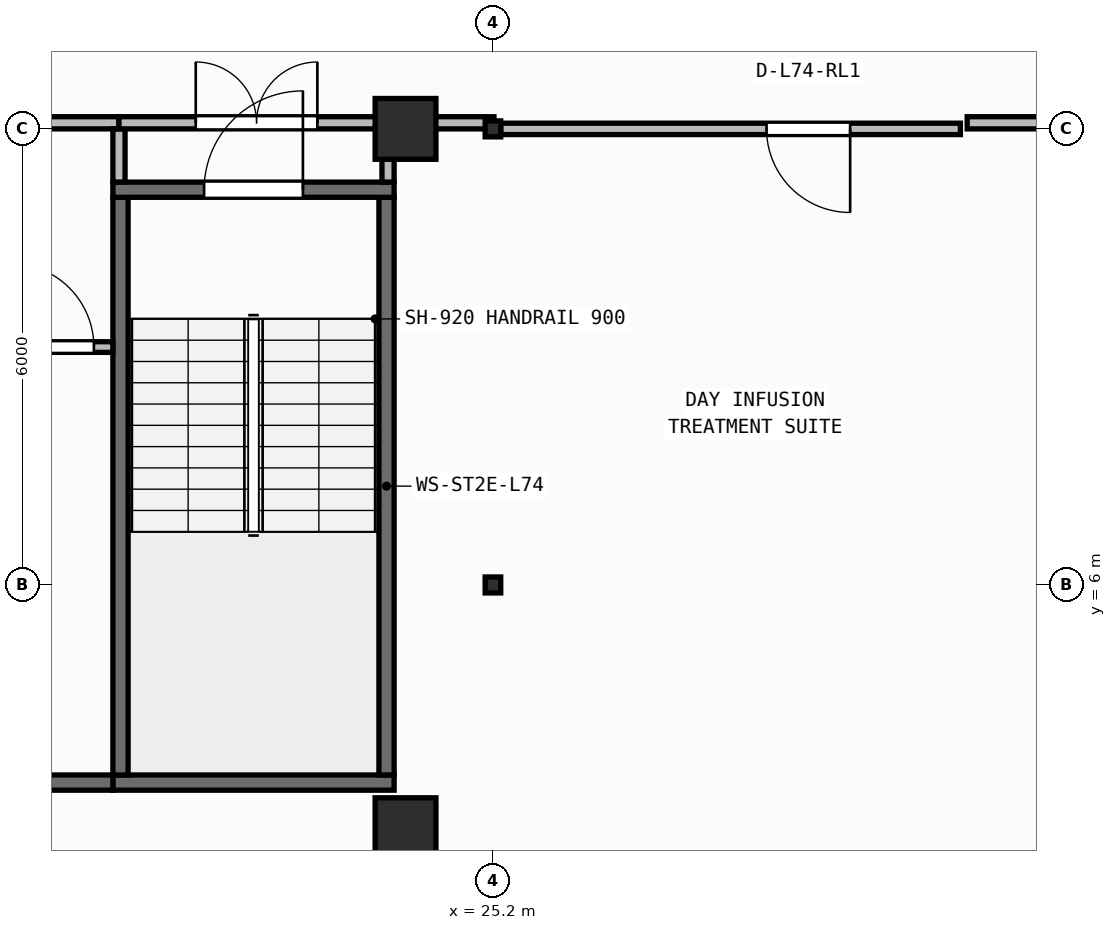
"""IFC4 building model, lengths in metres.
Left out: names, types, materials, properties, quantities, classifications, styles, units other than length and angle.
Written with IfcOpenShell. Run it as: python <this file> out.ifc"""

import sys

from ifc_helpers import new_model, si_unit, direction, frame, frame_2d, origin, origin_2d, place, context, subcontext, project, spatial, rectangle, i_section, extrude, element, fill, save


model = new_model("IFC4")
c1 = context("Model", 3, precision=1e-05, world=origin(), true_north=direction((0.0, 1.0)))
c2 = subcontext(c1, "Body", "Model", "MODEL_VIEW")
j1 = project(units=[si_unit("LENGTHUNIT", "METRE"), si_unit("PLANEANGLEUNIT", "RADIAN")], contexts=[c1])
p1 = place(None, origin())
s1 = spatial("IfcSite", under=j1, at=p1, CompositionType="ELEMENT")
p2 = place(p1, origin())
s2 = spatial("IfcBuilding", under=s1, at=p2, CompositionType="ELEMENT")
p3 = place(p2, frame((0.0, 0.0, 300.0)))
s3 = spatial("IfcBuildingStorey", under=s2, at=p3, CompositionType="ELEMENT", Elevation=300.0)
p4 = place(p3, frame((24.05, 2.8, 0.0), z_axis=(0.0, 0.0, 1.0), x_axis=(1.0, 0.0, 0.0)))
e1 = element("IfcColumn", 1, at=p4, inside=s3, PredefinedType="COLUMN", context=c2, shape_type="SweptSolid", body=[
    extrude(rectangle(XDim=0.8, YDim=0.8, at=origin_2d()), origin(), (0.0, 0.0, 1.0), 3.95),
])
p5 = place(p3, frame((25.2, 6.0, 0.0), z_axis=(0.0, 0.0, 1.0), x_axis=(1.0, 0.0, 0.0)))
e2 = element("IfcColumn", 2, at=p5, inside=s3, PredefinedType="COLUMN", context=c2, shape_type="SweptSolid", body=[
    extrude(i_section(OverallWidth=0.205, OverallDepth=0.21, WebThickness=0.009, FlangeThickness=0.014, FilletRadius=0.011, at=origin_2d()), origin(), (0.0, 0.0, 1.0), 3.95),
])
p6 = place(p3, frame((24.05, 12.0, 0.0), z_axis=(0.0, 0.0, 1.0), x_axis=(1.0, 0.0, 0.0)))
e3 = element("IfcColumn", 3, at=p6, inside=s3, PredefinedType="COLUMN", context=c2, shape_type="SweptSolid", body=[
    extrude(rectangle(XDim=0.8, YDim=0.8, at=origin_2d()), origin(), (0.0, 0.0, 1.0), 3.95),
])
p7 = place(p3, frame((25.2, 12.0, 0.0), z_axis=(0.0, 0.0, 1.0), x_axis=(1.0, 0.0, 0.0)))
e4 = element("IfcColumn", 4, at=p7, inside=s3, PredefinedType="COLUMN", context=c2, shape_type="SweptSolid", body=[
    extrude(i_section(OverallWidth=0.205, OverallDepth=0.21, WebThickness=0.009, FlangeThickness=0.014, FilletRadius=0.011, at=origin_2d()), origin(), (0.0, 0.0, 1.0), 3.95),
])
p8 = place(p3, frame((2.46, 0.171, 0.0), z_axis=(0.0, 0.0, 1.0), x_axis=(0.997760665813, 0.066885377746, 0.0)))
e5 = element("IfcWall", 5, at=p8, inside=s3, PredefinedType="STANDARD", context=c2, shape_type="SweptSolid", body=[
    extrude(rectangle(XDim=35.56, YDim=0.26, at=frame_2d((17.78, 0.0))), origin(), (0.0, 0.0, 1.0), 3.67),
])
p9 = place(p8, frame((16.58, 0.0, 0.9)))
e6 = element("IfcOpeningElement", 6, at=p9, cuts=e5, PredefinedType="OPENING", context=c2, shape_type="SweptSolid", body=[
    extrude(rectangle(XDim=2.4, YDim=1.65, at=frame_2d((1.2, 0.825))), frame((0.0, 0.14, 0.0), z_axis=(0.0, -1.0, 0.0), x_axis=(1.0, 0.0, 0.0)), (0.0, 0.0, 1.0), 0.28),
])
p10 = place(p3, frame((20.2, 3.4, 0.0), z_axis=(0.0, 0.0, 1.0), x_axis=(1.0, 0.0, 0.0)))
e7 = element("IfcWall", 7, at=p10, inside=s3, PredefinedType="SHEAR", context=c2, shape_type="SweptSolid", body=[
    extrude(rectangle(XDim=3.7, YDim=0.2, at=frame_2d((1.85, 0.0))), origin(), (0.0, 0.0, 1.0), 3.67),
])
for number, where, z_axis, x_axis in (
    (8, (20.3, 3.5, 0.0), (0.0, 0.0, 1.0), (0.0, 1.0, 0.0)),
    (9, (23.8, 3.5, 0.0), (0.0, 0.0, 1.0), (0.0, 1.0, 0.0)),
):
    element("IfcWall", number, at=place(p3, frame(where, z_axis=z_axis, x_axis=x_axis)), inside=s3, PredefinedType="SHEAR", context=c2, shape_type="SweptSolid", body=[
        extrude(rectangle(XDim=7.6, YDim=0.2, at=frame_2d((3.8, 0.0))), origin(), (0.0, 0.0, 1.0), 3.67),
    ])
p11 = place(p3, frame((20.2, 11.2, 0.0), z_axis=(0.0, 0.0, 1.0), x_axis=(1.0, 0.0, 0.0)))
e10 = element("IfcWall", 10, at=p11, inside=s3, PredefinedType="SHEAR", context=c2, shape_type="SweptSolid", body=[
    extrude(rectangle(XDim=3.7, YDim=0.2, at=frame_2d((1.85, 0.0))), origin(), (0.0, 0.0, 1.0), 3.67),
])
p12 = place(p11, frame((1.2, 0.0, 0.0)))
e11 = element("IfcOpeningElement", 11, at=p12, cuts=e10, PredefinedType="OPENING", context=c2, shape_type="SweptSolid", body=[
    extrude(rectangle(XDim=1.3, YDim=2.15, at=frame_2d((0.65, 1.075))), frame((0.0, 0.11, 0.0), z_axis=(0.0, -1.0, 0.0), x_axis=(1.0, 0.0, 0.0)), (0.0, 0.0, 1.0), 0.22),
])
p13 = place(p3, frame((6.5, 3.4, 0.0), z_axis=(0.0, 0.0, 1.0), x_axis=(1.0, 0.0, 0.0)))
e12 = element("IfcWall", 12, at=p13, inside=s3, PredefinedType="SHEAR", context=c2, shape_type="SweptSolid", body=[
    extrude(rectangle(XDim=13.7, YDim=0.2, at=frame_2d((6.85, 0.0))), origin(), (0.0, 0.0, 1.0), 3.67),
])
p14 = place(p3, frame((18.61, 9.13, 0.0), z_axis=(0.0, 0.0, 1.0), x_axis=(1.0, 0.0, 0.0)))
e13 = element("IfcWall", 13, at=p14, inside=s3, PredefinedType="PARTITIONING", context=c2, shape_type="SweptSolid", body=[
    extrude(rectangle(XDim=1.59, YDim=0.14, at=frame_2d((0.795, 0.0))), origin(), (0.0, 0.0, 1.0), 3.67),
])
p15 = place(p14, frame((0.24, 0.0, 0.0)))
e14 = element("IfcOpeningElement", 14, at=p15, cuts=e13, PredefinedType="OPENING", context=c2, shape_type="SweptSolid", body=[
    extrude(rectangle(XDim=1.1, YDim=2.1, at=frame_2d((0.55, 1.05))), frame((0.0, 0.08, 0.0), z_axis=(0.0, -1.0, 0.0), x_axis=(1.0, 0.0, 0.0)), (0.0, 0.0, 1.0), 0.16),
])
p16 = place(p3, frame((12.58, 12.08, 0.0), z_axis=(0.0, 0.0, 1.0), x_axis=(1.0, 0.0, 0.0)))
e15 = element("IfcWall", 15, at=p16, inside=s3, PredefinedType="PARTITIONING", context=c2, shape_type="SweptSolid", body=[
    extrude(rectangle(XDim=7.7, YDim=0.16, at=frame_2d((3.85, 0.0))), origin(), (0.0, 0.0, 1.0), 3.117),
])
p17 = place(p16, frame((3.05, 0.0, 0.0)))
e16 = element("IfcOpeningElement", 16, at=p17, cuts=e15, PredefinedType="OPENING", context=c2, shape_type="SweptSolid", body=[
    extrude(rectangle(XDim=1.6, YDim=2.05, at=frame_2d((0.8, 1.025))), frame((0.0, 0.09, 0.0), z_axis=(0.0, -1.0, 0.0), x_axis=(1.0, 0.0, 0.0)), (0.0, 0.0, 1.0), 0.18),
])
p18 = place(p3, frame((20.28, 11.3, 0.0), z_axis=(0.0, 0.0, 1.0), x_axis=(0.0, 1.0, 0.0)))
e17 = element("IfcWall", 17, at=p18, inside=s3, PredefinedType="PARTITIONING", context=c2, shape_type="SweptSolid", body=[
    extrude(rectangle(XDim=0.7, YDim=0.16, at=frame_2d((0.35, 0.0))), origin(), (0.0, 0.0, 1.0), 3.67),
])
p19 = place(p3, frame((20.28, 12.08, 0.0), z_axis=(0.0, 0.0, 1.0), x_axis=(1.0, 0.0, 0.0)))
e18 = element("IfcWall", 18, at=p19, inside=s3, PredefinedType="PARTITIONING", context=c2, shape_type="SweptSolid", body=[
    extrude(rectangle(XDim=3.62, YDim=0.16, at=frame_2d((1.81, 0.0))), origin(), (0.0, 0.0, 1.0), 3.117),
])
p20 = place(p19, frame((1.01, 0.0, 0.0)))
e19 = element("IfcOpeningElement", 19, at=p20, cuts=e18, PredefinedType="OPENING", context=c2, shape_type="SweptSolid", body=[
    extrude(rectangle(XDim=1.6, YDim=2.05, at=frame_2d((0.8, 1.025))), frame((0.0, 0.09, 0.0), z_axis=(0.0, -1.0, 0.0), x_axis=(1.0, 0.0, 0.0)), (0.0, 0.0, 1.0), 0.18),
])
p21 = place(p3, frame((23.82, 11.3, 0.0), z_axis=(0.0, 0.0, 1.0), x_axis=(0.0, 1.0, 0.0)))
e20 = element("IfcWall", 20, at=p21, inside=s3, PredefinedType="PARTITIONING", context=c2, shape_type="SweptSolid", body=[
    extrude(rectangle(XDim=0.7, YDim=0.16, at=frame_2d((0.35, 0.0))), origin(), (0.0, 0.0, 1.0), 3.67),
])
p22 = place(p3, frame((31.35, 12.0, 0.0), z_axis=(0.0, 0.0, 1.0), x_axis=(-1.0, 0.0, 0.0)))
e21 = element("IfcWall", 21, at=p22, inside=s3, PredefinedType="PARTITIONING", context=c2, shape_type="SweptSolid", body=[
    extrude(rectangle(XDim=6.048, YDim=0.15, at=frame_2d((3.024, 0.0))), origin(), (0.0, 0.0, 1.0), 3.117),
])
p23 = place(p22, frame((1.451, 0.0, 0.0)))
e22 = element("IfcOpeningElement", 22, at=p23, cuts=e21, PredefinedType="OPENING", context=c2, shape_type="SweptSolid", body=[
    extrude(rectangle(XDim=1.1, YDim=2.1, at=frame_2d((0.55, 1.05))), frame((0.0, 0.085, 0.0), z_axis=(0.0, -1.0, 0.0), x_axis=(1.0, 0.0, 0.0)), (0.0, 0.0, 1.0), 0.17),
])
p24 = place(p3, frame((24.02, 12.08, 0.0), z_axis=(0.0, 0.0, 1.0), x_axis=(1.0, 0.0, 0.0)))
e23 = element("IfcWall", 23, at=p24, inside=s3, PredefinedType="PARTITIONING", context=c2, shape_type="SweptSolid", body=[
    extrude(rectangle(XDim=1.193, YDim=0.16, at=frame_2d((0.597, 0.0))), origin(), (0.0, 0.0, 1.0), 3.117),
])
p25 = place(p3, frame((31.439, 12.08, 0.0), z_axis=(0.0, 0.0, 1.0), x_axis=(1.0, 0.0, 0.0)))
e24 = element("IfcWall", 24, at=p25, inside=s3, PredefinedType="PARTITIONING", context=c2, shape_type="SweptSolid", body=[
    extrude(rectangle(XDim=2.174, YDim=0.16, at=frame_2d((1.087, 0.0))), origin(), (0.0, 0.0, 1.0), 3.117),
])
p26 = place(p12, origin())
e25 = element("IfcDoor", 25, at=p26, inside=s3, OperationType="SINGLE_SWING_RIGHT", PredefinedType="DOOR", context=c2, shape_type="SweptSolid", body=[
    extrude(rectangle(XDim=1.3, YDim=2.15, at=frame_2d((0.65, 1.075))), frame((0.0, 0.025, 0.0), z_axis=(0.0, -1.0, 0.0), x_axis=(1.0, 0.0, 0.0)), (0.0, 0.0, 1.0), 0.05),
])
fill(e11, e25)
p27 = place(p15, origin())
e26 = element("IfcDoor", 26, at=p27, inside=s3, OperationType="SINGLE_SWING_LEFT", PredefinedType="DOOR", context=c2, shape_type="SweptSolid", body=[
    extrude(rectangle(XDim=1.1, YDim=2.1, at=frame_2d((0.55, 1.05))), frame((0.0, 0.025, 0.0), z_axis=(0.0, -1.0, 0.0), x_axis=(1.0, 0.0, 0.0)), (0.0, 0.0, 1.0), 0.05),
])
fill(e14, e26)
p28 = place(p20, origin())
e27 = element("IfcDoor", 27, at=p28, inside=s3, OperationType="DOUBLE_DOOR_SINGLE_SWING", PredefinedType="DOOR", context=c2, shape_type="SweptSolid", body=[
    extrude(rectangle(XDim=1.6, YDim=2.05, at=frame_2d((0.8, 1.025))), frame((0.0, 0.025, 0.0), z_axis=(0.0, -1.0, 0.0), x_axis=(1.0, 0.0, 0.0)), (0.0, 0.0, 1.0), 0.05),
])
fill(e19, e27)
p29 = place(p23, origin())
e28 = element("IfcDoor", 28, at=p29, inside=s3, OperationType="SINGLE_SWING_LEFT", PredefinedType="DOOR", context=c2, shape_type="SweptSolid", body=[
    extrude(rectangle(XDim=1.1, YDim=2.1, at=frame_2d((0.55, 1.05))), frame((0.0, 0.025, 0.0), z_axis=(0.0, -1.0, 0.0), x_axis=(1.0, 0.0, 0.0)), (0.0, 0.0, 1.0), 0.05),
])
fill(e22, e28)
save(model, sys.argv[1])
